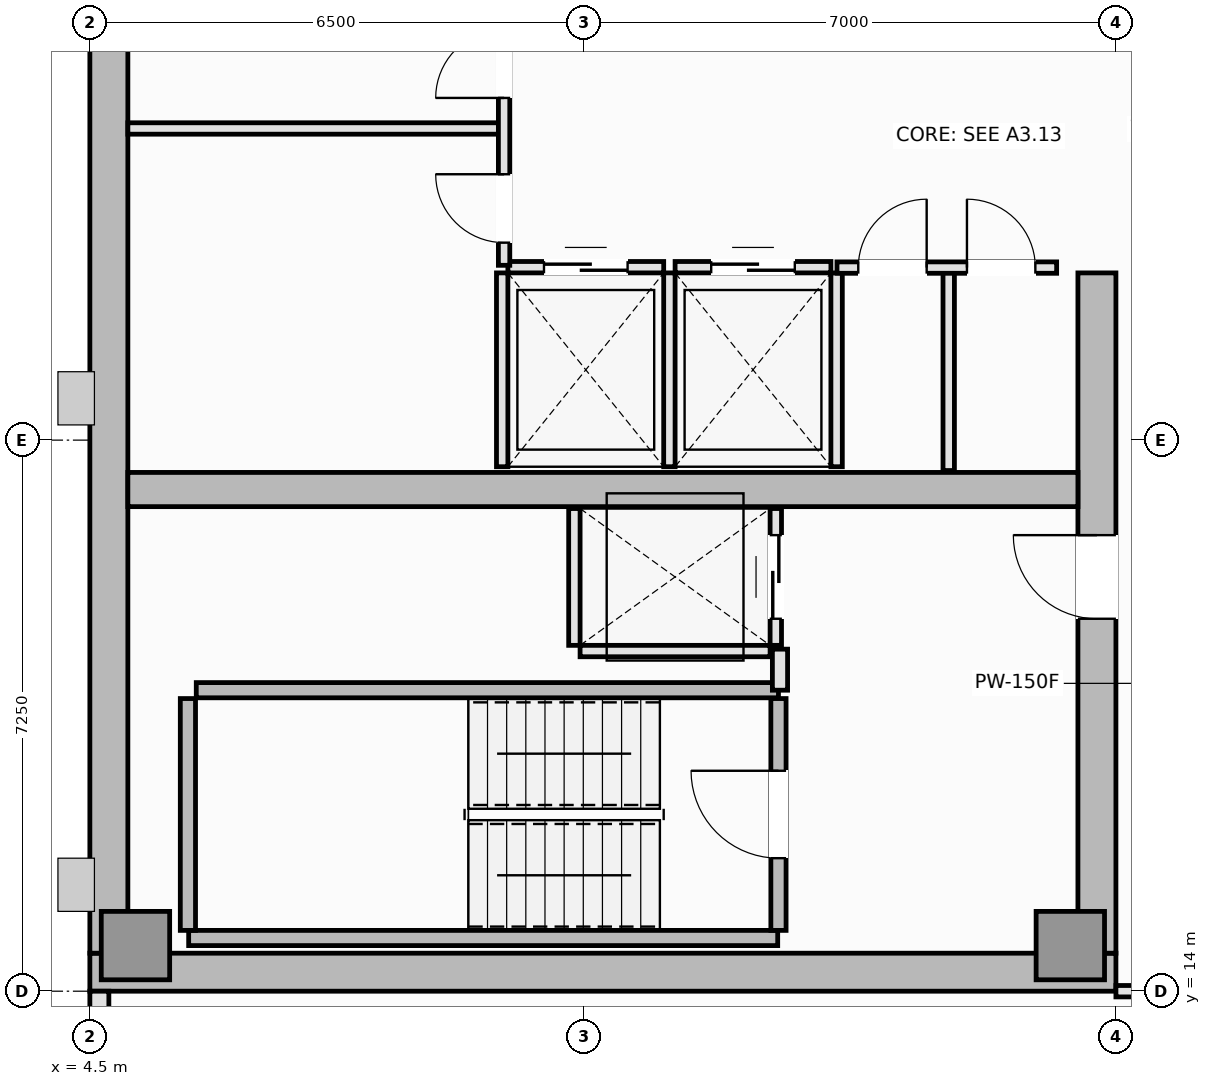
"""IFC4 building model, lengths in metres.
Left out: names, types, materials, properties, quantities, classifications, styles, units other than length and angle.
Written with IfcOpenShell. Run it as: python <this file> out.ifc"""

import sys

from ifc_helpers import new_model, si_unit, direction, frame, frame_2d, origin, origin_2d, place, context, subcontext, project, spatial, rectangle, extrude, element, fill, save


model = new_model("IFC4")
c1 = context("Model", 3, precision=1e-05, world=origin(), true_north=direction((0.0, 1.0)))
c2 = subcontext(c1, "Body", "Model", "MODEL_VIEW")
j1 = project(units=[si_unit("LENGTHUNIT", "METRE"), si_unit("PLANEANGLEUNIT", "RADIAN")], contexts=[c1])
p1 = place(None, origin())
s1 = spatial("IfcSite", under=j1, at=p1, CompositionType="ELEMENT")
p2 = place(p1, origin())
s2 = spatial("IfcBuilding", under=s1, at=p2, CompositionType="ELEMENT")
p3 = place(p2, frame((0.0, 0.0, 270.55)))
s3 = spatial("IfcBuildingStorey", under=s2, at=p3, CompositionType="ELEMENT", Elevation=270.55)
p4 = place(p3, frame((4.5, 14.25, 0.0), z_axis=(0.0, 0.0, 1.0), x_axis=(1.0, 0.0, 0.0)))
e1 = element("IfcWall", 1, at=p4, inside=s3, PredefinedType="SHEAR", context=c2, shape_type="SweptSolid", body=[
    extrude(rectangle(XDim=13.5, YDim=0.5, at=frame_2d((6.75, 0.0))), origin(), (0.0, 0.0, 1.0), 3.55),
])
p5 = place(p3, frame((4.75, 14.5, 0.0), z_axis=(0.0, 0.0, 1.0), x_axis=(0.0, 1.0, 0.0)))
e2 = element("IfcWall", 2, at=p5, inside=s3, PredefinedType="SHEAR", context=c2, shape_type="SweptSolid", body=[
    extrude(rectangle(XDim=21.5, YDim=0.5, at=frame_2d((10.75, 0.0))), origin(), (0.0, 0.0, 1.0), 3.55),
])
p6 = place(p3, frame((17.75, 14.5, 0.0), z_axis=(0.0, 0.0, 1.0), x_axis=(0.0, 1.0, 0.0)))
e3 = element("IfcWall", 3, at=p6, inside=s3, PredefinedType="SHEAR", context=c2, shape_type="SweptSolid", body=[
    extrude(rectangle(XDim=8.95, YDim=0.5, at=frame_2d((4.475, 0.0))), origin(), (0.0, 0.0, 1.0), 3.55),
])
p7 = place(p6, frame((4.4, 0.0, 0.0)))
e4 = element("IfcOpeningElement", 4, at=p7, cuts=e3, PredefinedType="OPENING", context=c2, shape_type="SweptSolid", body=[
    extrude(rectangle(XDim=1.1, YDim=2.15, at=frame_2d((0.55, 1.075))), frame((0.0, 0.26, 0.0), z_axis=(0.0, -1.0, 0.0), x_axis=(1.0, 0.0, 0.0)), (0.0, 0.0, 1.0), 0.52),
])
p8 = place(p3, frame((5.0, 20.6, 0.0), z_axis=(0.0, 0.0, 1.0), x_axis=(1.0, 0.0, 0.0)))
e5 = element("IfcWall", 5, at=p8, inside=s3, PredefinedType="SHEAR", context=c2, shape_type="SweptSolid", body=[
    extrude(rectangle(XDim=12.5, YDim=0.45, at=frame_2d((6.25, 0.0))), origin(), (0.0, 0.0, 1.0), 3.55),
])
for number, where, z_axis, x_axis in (
    (6, (5.1, 14.6, 0.0), (0.0, 0.0, 1.0), (1.0, 0.0, 0.0)),
    (7, (17.4, 14.6, 0.0), (0.0, 0.0, 1.0), (1.0, 0.0, 0.0)),
):
    element("IfcColumn", number, at=place(p3, frame(where, z_axis=z_axis, x_axis=x_axis)), inside=s3, PredefinedType="PILASTER", context=c2, shape_type="SweptSolid", body=[
        extrude(rectangle(XDim=0.9, YDim=0.9, at=origin_2d()), origin(), (0.0, 0.0, 1.0), 3.55),
    ])
p9 = place(p3, frame((4.625, 14.0, 0.0), z_axis=(0.0, 0.0, 1.0), x_axis=(0.0, -1.0, 0.0)))
e8 = element("IfcWall", 8, at=p9, inside=s3, PredefinedType="SOLIDWALL", context=c2, shape_type="SweptSolid", body=[
    extrude(rectangle(XDim=3.4, YDim=0.25, at=frame_2d((1.7, 0.0))), origin(), (0.0, 0.0, 1.0), 3.39),
])
p10 = place(p9, frame((0.6, 0.0, 0.9)))
e9 = element("IfcOpeningElement", 9, at=p10, cuts=e8, PredefinedType="OPENING", context=c2, shape_type="SweptSolid", body=[
    extrude(rectangle(XDim=2.2, YDim=1.8, at=frame_2d((1.1, 0.9))), frame((0.0, 0.135, 0.0), z_axis=(0.0, -1.0, 0.0), x_axis=(1.0, 0.0, 0.0)), (0.0, 0.0, 1.0), 0.27),
])
p11 = place(p3, frame((5.8, 14.7, 0.0), z_axis=(0.0, 0.0, 1.0), x_axis=(1.0, 0.0, 0.0)))
e10 = element("IfcWall", 10, at=p11, inside=s3, PredefinedType="SOLIDWALL", context=c2, shape_type="SweptSolid", body=[
    extrude(rectangle(XDim=7.75, YDim=0.2, at=frame_2d((3.875, 0.0))), origin(), (0.0, 0.0, 1.0), 3.55),
])
p12 = place(p3, frame((5.79, 14.8, 0.0), z_axis=(0.0, 0.0, 1.0), x_axis=(0.0, 1.0, 0.0)))
e11 = element("IfcWall", 11, at=p12, inside=s3, PredefinedType="SOLIDWALL", context=c2, shape_type="SweptSolid", body=[
    extrude(rectangle(XDim=3.05, YDim=0.2, at=frame_2d((1.525, 0.0))), origin(), (0.0, 0.0, 1.0), 3.55),
])
p13 = place(p3, frame((5.9, 17.96, 0.0), z_axis=(0.0, 0.0, 1.0), x_axis=(1.0, 0.0, 0.0)))
e12 = element("IfcWall", 12, at=p13, inside=s3, PredefinedType="SOLIDWALL", context=c2, shape_type="SweptSolid", body=[
    extrude(rectangle(XDim=7.66, YDim=0.2, at=frame_2d((3.83, 0.0))), origin(), (0.0, 0.0, 1.0), 3.55),
])
p14 = place(p3, frame((13.56, 14.8, 0.0), z_axis=(0.0, 0.0, 1.0), x_axis=(0.0, 1.0, 0.0)))
e13 = element("IfcWall", 13, at=p14, inside=s3, PredefinedType="SOLIDWALL", context=c2, shape_type="SweptSolid", body=[
    extrude(rectangle(XDim=3.05, YDim=0.2, at=frame_2d((1.525, 0.0))), origin(), (0.0, 0.0, 1.0), 3.55),
])
p15 = place(p14, frame((0.95, 0.0, 0.0)))
e14 = element("IfcOpeningElement", 14, at=p15, cuts=e13, PredefinedType="OPENING", context=c2, shape_type="SweptSolid", body=[
    extrude(rectangle(XDim=1.15, YDim=2.15, at=frame_2d((0.575, 1.075))), frame((0.0, 0.11, 0.0), z_axis=(0.0, -1.0, 0.0), x_axis=(1.0, 0.0, 0.0)), (0.0, 0.0, 1.0), 0.22),
])
p16 = place(p3, frame((10.0, 23.525, 0.0), z_axis=(0.0, 0.0, 1.0), x_axis=(1.0, 0.0, 0.0)))
e15 = element("IfcWall", 15, at=p16, inside=s3, PredefinedType="PARTITIONING", context=c2, shape_type="SweptSolid", body=[
    extrude(rectangle(XDim=2.05, YDim=0.15, at=frame_2d((1.025, 0.0))), origin(), (0.0, 0.0, 1.0), 3.39),
])
p17 = place(p16, frame((0.475, 0.0, 0.0)))
e16 = element("IfcOpeningElement", 16, at=p17, cuts=e15, PredefinedType="OPENING", context=c2, shape_type="SweptSolid", body=[
    extrude(rectangle(XDim=1.1, YDim=2.2, at=frame_2d((0.55, 1.1))), frame((0.0, 0.085, 0.0), z_axis=(0.0, -1.0, 0.0), x_axis=(1.0, 0.0, 0.0)), (0.0, 0.0, 1.0), 0.17),
])
for number, where, z_axis, x_axis in (
    (17, (9.925, 20.9, 0.0), (0.0, 0.0, 1.0), (0.0, 1.0, 0.0)),
    (18, (12.125, 20.9, 0.0), (0.0, 0.0, 1.0), (0.0, 1.0, 0.0)),
):
    element("IfcWall", number, at=place(p3, frame(where, z_axis=z_axis, x_axis=x_axis)), inside=s3, PredefinedType="PARTITIONING", context=c2, shape_type="SweptSolid", body=[
        extrude(rectangle(XDim=2.55, YDim=0.15, at=frame_2d((1.275, 0.0))), origin(), (0.0, 0.0, 1.0), 3.39),
    ])
p18 = place(p3, frame((12.2, 23.525, 0.0), z_axis=(0.0, 0.0, 1.0), x_axis=(1.0, 0.0, 0.0)))
e19 = element("IfcWall", 19, at=p18, inside=s3, PredefinedType="PARTITIONING", context=c2, shape_type="SweptSolid", body=[
    extrude(rectangle(XDim=2.05, YDim=0.15, at=frame_2d((1.025, 0.0))), origin(), (0.0, 0.0, 1.0), 3.39),
])
p19 = place(p18, frame((0.475, 0.0, 0.0)))
e20 = element("IfcOpeningElement", 20, at=p19, cuts=e19, PredefinedType="OPENING", context=c2, shape_type="SweptSolid", body=[
    extrude(rectangle(XDim=1.1, YDim=2.2, at=frame_2d((0.55, 1.1))), frame((0.0, 0.085, 0.0), z_axis=(0.0, -1.0, 0.0), x_axis=(1.0, 0.0, 0.0)), (0.0, 0.0, 1.0), 0.17),
])
p20 = place(p3, frame((14.325, 20.9, 0.0), z_axis=(0.0, 0.0, 1.0), x_axis=(0.0, 1.0, 0.0)))
e21 = element("IfcWall", 21, at=p20, inside=s3, PredefinedType="PARTITIONING", context=c2, shape_type="SweptSolid", body=[
    extrude(rectangle(XDim=2.55, YDim=0.15, at=frame_2d((1.275, 0.0))), origin(), (0.0, 0.0, 1.0), 3.39),
])
p21 = place(p3, frame((10.95, 18.475, 0.0), z_axis=(0.0, 0.0, 1.0), x_axis=(1.0, 0.0, 0.0)))
e22 = element("IfcWall", 22, at=p21, inside=s3, PredefinedType="PARTITIONING", context=c2, shape_type="SweptSolid", body=[
    extrude(rectangle(XDim=2.5, YDim=0.15, at=frame_2d((1.25, 0.0))), origin(), (0.0, 0.0, 1.0), 3.39),
])
p22 = place(p3, frame((10.875, 18.55, 0.0), z_axis=(0.0, 0.0, 1.0), x_axis=(0.0, 1.0, 0.0)))
e23 = element("IfcWall", 23, at=p22, inside=s3, PredefinedType="PARTITIONING", context=c2, shape_type="SweptSolid", body=[
    extrude(rectangle(XDim=1.8, YDim=0.15, at=frame_2d((0.9, 0.0))), origin(), (0.0, 0.0, 1.0), 3.39),
])
p23 = place(p3, frame((13.525, 18.55, 0.0), z_axis=(0.0, 0.0, 1.0), x_axis=(0.0, 1.0, 0.0)))
e24 = element("IfcWall", 24, at=p23, inside=s3, PredefinedType="PARTITIONING", context=c2, shape_type="SweptSolid", body=[
    extrude(rectangle(XDim=1.8, YDim=0.15, at=frame_2d((0.9, 0.0))), origin(), (0.0, 0.0, 1.0), 3.39),
])
p24 = place(p23, frame((0.35, 0.0, 0.0)))
e25 = element("IfcOpeningElement", 25, at=p24, cuts=e24, PredefinedType="OPENING", context=c2, shape_type="SweptSolid", body=[
    extrude(rectangle(XDim=1.1, YDim=2.2, at=frame_2d((0.55, 1.1))), frame((0.0, 0.085, 0.0), z_axis=(0.0, -1.0, 0.0), x_axis=(1.0, 0.0, 0.0)), (0.0, 0.0, 1.0), 0.17),
])
p25 = place(p3, frame((13.58, 17.96, 0.0), z_axis=(0.0, 0.0, 1.0), x_axis=(0.0, 1.0, 0.0)))
e26 = element("IfcWall", 26, at=p25, inside=s3, PredefinedType="PARTITIONING", context=c2, shape_type="SweptSolid", body=[
    extrude(rectangle(XDim=0.54, YDim=0.2, at=frame_2d((0.27, 0.0))), origin(), (0.0, 0.0, 1.0), 3.39),
])
p26 = place(p3, frame((5.0, 25.35, 0.0), z_axis=(0.0, 0.0, 1.0), x_axis=(1.0, 0.0, 0.0)))
e27 = element("IfcWall", 27, at=p26, inside=s3, PredefinedType="PARTITIONING", context=c2, shape_type="SweptSolid", body=[
    extrude(rectangle(XDim=4.95, YDim=0.15, at=frame_2d((2.475, 0.0))), origin(), (0.0, 0.0, 1.0), 3.39),
])
p27 = place(p3, frame((9.95, 23.55, 0.0), z_axis=(0.0, 0.0, 1.0), x_axis=(0.0, 1.0, 0.0)))
e28 = element("IfcWall", 28, at=p27, inside=s3, PredefinedType="PARTITIONING", context=c2, shape_type="SweptSolid", body=[
    extrude(rectangle(XDim=3.4, YDim=0.15, at=frame_2d((1.7, 0.0))), origin(), (0.0, 0.0, 1.0), 3.39),
])
p28 = place(p27, frame((0.298, 0.0, 0.0)))
e29 = element("IfcOpeningElement", 29, at=p28, cuts=e28, PredefinedType="OPENING", context=c2, shape_type="SweptSolid", body=[
    extrude(rectangle(XDim=0.9, YDim=2.1, at=frame_2d((0.45, 1.05))), frame((0.0, 0.085, 0.0), z_axis=(0.0, -1.0, 0.0), x_axis=(1.0, 0.0, 0.0)), (0.0, 0.0, 1.0), 0.17),
])
p29 = place(p27, frame((2.202, 0.0, 0.0)))
e30 = element("IfcOpeningElement", 30, at=p29, cuts=e28, PredefinedType="OPENING", context=c2, shape_type="SweptSolid", body=[
    extrude(rectangle(XDim=0.9, YDim=2.1, at=frame_2d((0.45, 1.05))), frame((0.0, 0.085, 0.0), z_axis=(0.0, -1.0, 0.0), x_axis=(1.0, 0.0, 0.0)), (0.0, 0.0, 1.0), 0.17),
])
p30 = place(p3, frame((15.8, 20.85, 0.0), z_axis=(0.0, 0.0, 1.0), x_axis=(0.0, 1.0, 0.0)))
e31 = element("IfcWall", 31, at=p30, inside=s3, PredefinedType="PARTITIONING", context=c2, shape_type="SweptSolid", body=[
    extrude(rectangle(XDim=2.67, YDim=0.15, at=frame_2d((1.335, 0.0))), origin(), (0.0, 0.0, 1.0), 3.39),
])
p31 = place(p3, frame((14.33, 23.52, 0.0), z_axis=(0.0, 0.0, 1.0), x_axis=(1.0, 0.0, 0.0)))
e32 = element("IfcWall", 32, at=p31, inside=s3, PredefinedType="PARTITIONING", context=c2, shape_type="SweptSolid", body=[
    extrude(rectangle(XDim=2.89, YDim=0.15, at=frame_2d((1.445, 0.0))), origin(), (0.0, 0.0, 1.0), 3.39),
])
p32 = place(p31, frame((0.28, 0.0, 0.0)))
e33 = element("IfcOpeningElement", 33, at=p32, cuts=e32, PredefinedType="OPENING", context=c2, shape_type="SweptSolid", body=[
    extrude(rectangle(XDim=0.9, YDim=2.1, at=frame_2d((0.45, 1.05))), frame((0.0, 0.085, 0.0), z_axis=(0.0, -1.0, 0.0), x_axis=(1.0, 0.0, 0.0)), (0.0, 0.0, 1.0), 0.17),
])
p33 = place(p31, frame((1.71, 0.0, 0.0)))
e34 = element("IfcOpeningElement", 34, at=p33, cuts=e32, PredefinedType="OPENING", context=c2, shape_type="SweptSolid", body=[
    extrude(rectangle(XDim=0.9, YDim=2.1, at=frame_2d((0.45, 1.05))), frame((0.0, 0.085, 0.0), z_axis=(0.0, -1.0, 0.0), x_axis=(1.0, 0.0, 0.0)), (0.0, 0.0, 1.0), 0.17),
])
p34 = place(p3, frame((18.0, 14.0, 0.0), z_axis=(0.0, 0.0, 1.0), x_axis=(1.0, 0.0, 0.0)))
e35 = element("IfcWall", 35, at=p34, inside=s3, PredefinedType="PARTITIONING", context=c2, shape_type="SweptSolid", body=[
    extrude(rectangle(XDim=1.9, YDim=0.15, at=frame_2d((0.95, 0.0))), origin(), (0.0, 0.0, 1.0), 3.39),
])
p35 = place(p34, frame((0.5, 0.0, 0.0)))
e36 = element("IfcOpeningElement", 36, at=p35, cuts=e35, PredefinedType="OPENING", context=c2, shape_type="SweptSolid", body=[
    extrude(rectangle(XDim=0.9, YDim=2.1, at=frame_2d((0.45, 1.05))), frame((0.0, 0.085, 0.0), z_axis=(0.0, -1.0, 0.0), x_axis=(1.0, 0.0, 0.0)), (0.0, 0.0, 1.0), 0.17),
])
p36 = place(p15, origin())
e37 = element("IfcDoor", 37, at=p36, inside=s3, OperationType="SINGLE_SWING_RIGHT", PredefinedType="DOOR", context=c2, shape_type="SweptSolid", body=[
    extrude(rectangle(XDim=1.15, YDim=2.15, at=frame_2d((0.575, 1.075))), frame((0.0, 0.025, 0.0), z_axis=(0.0, -1.0, 0.0), x_axis=(1.0, 0.0, 0.0)), (0.0, 0.0, 1.0), 0.05),
])
fill(e14, e37)
p37 = place(p17, origin())
e38 = element("IfcDoor", 38, at=p37, inside=s3, OperationType="DOUBLE_DOOR_SLIDING", PredefinedType="DOOR", context=c2, shape_type="SweptSolid", body=[
    extrude(rectangle(XDim=1.1, YDim=2.2, at=frame_2d((0.55, 1.1))), frame((0.0, 0.025, 0.0), z_axis=(0.0, -1.0, 0.0), x_axis=(1.0, 0.0, 0.0)), (0.0, 0.0, 1.0), 0.05),
])
fill(e16, e38)
p38 = place(p19, origin())
e39 = element("IfcDoor", 39, at=p38, inside=s3, OperationType="DOUBLE_DOOR_SLIDING", PredefinedType="DOOR", context=c2, shape_type="SweptSolid", body=[
    extrude(rectangle(XDim=1.1, YDim=2.2, at=frame_2d((0.55, 1.1))), frame((0.0, 0.025, 0.0), z_axis=(0.0, -1.0, 0.0), x_axis=(1.0, 0.0, 0.0)), (0.0, 0.0, 1.0), 0.05),
])
fill(e20, e39)
p39 = place(p24, origin())
e40 = element("IfcDoor", 40, at=p39, inside=s3, OperationType="DOUBLE_DOOR_SLIDING", PredefinedType="DOOR", context=c2, shape_type="SweptSolid", body=[
    extrude(rectangle(XDim=1.1, YDim=2.2, at=frame_2d((0.55, 1.1))), frame((0.0, 0.025, 0.0), z_axis=(0.0, -1.0, 0.0), x_axis=(1.0, 0.0, 0.0)), (0.0, 0.0, 1.0), 0.05),
])
fill(e25, e40)
p40 = place(p7, origin())
e41 = element("IfcDoor", 41, at=p40, inside=s3, OperationType="SINGLE_SWING_RIGHT", PredefinedType="DOOR", context=c2, shape_type="SweptSolid", body=[
    extrude(rectangle(XDim=1.1, YDim=2.15, at=frame_2d((0.55, 1.075))), frame((0.0, 0.025, 0.0), z_axis=(0.0, -1.0, 0.0), x_axis=(1.0, 0.0, 0.0)), (0.0, 0.0, 1.0), 0.05),
])
fill(e4, e41)
p41 = place(p28, origin())
e42 = element("IfcDoor", 42, at=p41, inside=s3, OperationType="SINGLE_SWING_RIGHT", PredefinedType="DOOR", context=c2, shape_type="SweptSolid", body=[
    extrude(rectangle(XDim=0.9, YDim=2.1, at=frame_2d((0.45, 1.05))), frame((0.0, 0.025, 0.0), z_axis=(0.0, -1.0, 0.0), x_axis=(1.0, 0.0, 0.0)), (0.0, 0.0, 1.0), 0.05),
])
fill(e29, e42)
p42 = place(p29, origin())
e43 = element("IfcDoor", 43, at=p42, inside=s3, OperationType="SINGLE_SWING_LEFT", PredefinedType="DOOR", context=c2, shape_type="SweptSolid", body=[
    extrude(rectangle(XDim=0.9, YDim=2.1, at=frame_2d((0.45, 1.05))), frame((0.0, 0.025, 0.0), z_axis=(0.0, -1.0, 0.0), x_axis=(1.0, 0.0, 0.0)), (0.0, 0.0, 1.0), 0.05),
])
fill(e30, e43)
p43 = place(p32, origin())
e44 = element("IfcDoor", 44, at=p43, inside=s3, OperationType="SINGLE_SWING_RIGHT", PredefinedType="DOOR", context=c2, shape_type="SweptSolid", body=[
    extrude(rectangle(XDim=0.9, YDim=2.1, at=frame_2d((0.45, 1.05))), frame((0.0, 0.025, 0.0), z_axis=(0.0, -1.0, 0.0), x_axis=(1.0, 0.0, 0.0)), (0.0, 0.0, 1.0), 0.05),
])
fill(e33, e44)
p44 = place(p33, origin())
e45 = element("IfcDoor", 45, at=p44, inside=s3, OperationType="SINGLE_SWING_LEFT", PredefinedType="DOOR", context=c2, shape_type="SweptSolid", body=[
    extrude(rectangle(XDim=0.9, YDim=2.1, at=frame_2d((0.45, 1.05))), frame((0.0, 0.025, 0.0), z_axis=(0.0, -1.0, 0.0), x_axis=(1.0, 0.0, 0.0)), (0.0, 0.0, 1.0), 0.05),
])
fill(e34, e45)
save(model, sys.argv[1])
